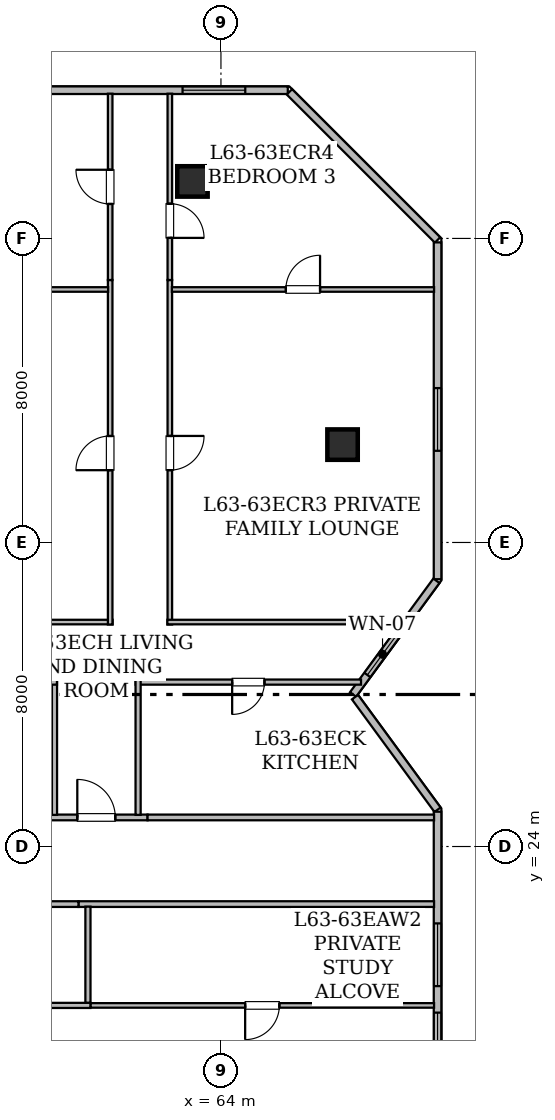
"""IFC4 building model, lengths in metres.
Left out: names, types, materials, properties, quantities, classifications, styles, units other than length and angle.
Written with IfcOpenShell. Run it as: python <this file> out.ifc"""

import sys

from ifc_helpers import new_model, si_unit, direction, frame, frame_2d, origin, origin_2d, place, context, subcontext, project, spatial, rectangle, hollow_rectangle, extrude, element, fill, save


model = new_model("IFC4")
c1 = context("Model", 3, precision=1e-05, world=origin(), true_north=direction((0.0, 1.0)))
c2 = subcontext(c1, "Body", "Model", "MODEL_VIEW")
j1 = project(units=[si_unit("LENGTHUNIT", "METRE"), si_unit("PLANEANGLEUNIT", "RADIAN")], contexts=[c1])
p1 = place(None, origin())
s1 = spatial("IfcSite", under=j1, at=p1, CompositionType="ELEMENT")
p2 = place(p1, origin())
s2 = spatial("IfcBuilding", under=s1, at=p2, CompositionType="ELEMENT")
p3 = place(p2, frame((0.0, 0.0, 246.4)))
s3 = spatial("IfcBuildingStorey", under=s2, at=p3, CompositionType="ELEMENT", Elevation=246.4)
for number, where, z_axis, x_axis in (
    (1, (63.25, 41.5, 0.0), (0.0, 0.0, 1.0), (1.0, 0.0, 0.0)),
    (2, (67.2, 21.425, 0.0), (0.0, 0.0, 1.0), (1.0, 0.0, 0.0)),
    (3, (67.2, 34.575, 0.0), (0.0, 0.0, 1.0), (1.0, 0.0, 0.0)),
):
    element("IfcColumn", number, at=place(p3, frame(where, z_axis=z_axis, x_axis=x_axis)), inside=s3, PredefinedType="COLUMN", context=c2, shape_type="SweptSolid", body=[
        extrude(hollow_rectangle(XDim=0.8, YDim=0.8, WallThickness=0.04, at=origin_2d()), origin(), (0.0, 0.0, 1.0), 3.65),
    ])
p4 = place(p3, frame((24.302, 43.9, 0.0), z_axis=(0.0, 0.0, 1.0), x_axis=(1.0, 0.0, 0.0)))
e4 = element("IfcWall", 4, at=p4, inside=s3, PredefinedType="STANDARD", context=c2, shape_type="SweptSolid", body=[
    extrude(rectangle(XDim=41.457, YDim=0.2, at=frame_2d((20.729, 0.0))), origin(), (0.0, 0.0, 1.0), 3.43),
])
p5 = place(p4, frame((4.673, 0.0, 0.85)))
e5 = element("IfcOpeningElement", 5, at=p5, cuts=e4, PredefinedType="OPENING", context=c2, shape_type="SweptSolid", body=[
    extrude(rectangle(XDim=1.65, YDim=1.55, at=frame_2d((0.825, 0.775))), frame((0.0, 0.11, 0.0), z_axis=(0.0, -1.0, 0.0), x_axis=(1.0, 0.0, 0.0)), (0.0, 0.0, 1.0), 0.22),
])
p6 = place(p4, frame((12.063, 0.0, 0.85)))
e6 = element("IfcOpeningElement", 6, at=p6, cuts=e4, PredefinedType="OPENING", context=c2, shape_type="SweptSolid", body=[
    extrude(rectangle(XDim=1.65, YDim=1.55, at=frame_2d((0.825, 0.775))), frame((0.0, 0.11, 0.0), z_axis=(0.0, -1.0, 0.0), x_axis=(1.0, 0.0, 0.0)), (0.0, 0.0, 1.0), 0.22),
])
p7 = place(p4, frame((14.905, 0.0, 0.85)))
e7 = element("IfcOpeningElement", 7, at=p7, cuts=e4, PredefinedType="OPENING", context=c2, shape_type="SweptSolid", body=[
    extrude(rectangle(XDim=1.65, YDim=1.55, at=frame_2d((0.825, 0.775))), frame((0.0, 0.11, 0.0), z_axis=(0.0, -1.0, 0.0), x_axis=(1.0, 0.0, 0.0)), (0.0, 0.0, 1.0), 0.22),
])
p8 = place(p4, frame((17.825, 0.0, 0.85)))
e8 = element("IfcOpeningElement", 8, at=p8, cuts=e4, PredefinedType="OPENING", context=c2, shape_type="SweptSolid", body=[
    extrude(rectangle(XDim=1.65, YDim=1.55, at=frame_2d((0.825, 0.775))), frame((0.0, 0.11, 0.0), z_axis=(0.0, -1.0, 0.0), x_axis=(1.0, 0.0, 0.0)), (0.0, 0.0, 1.0), 0.22),
])
p9 = place(p4, frame((20.176, 0.0, 0.8)))
e9 = element("IfcOpeningElement", 9, at=p9, cuts=e4, PredefinedType="OPENING", context=c2, shape_type="SweptSolid", body=[
    extrude(rectangle(XDim=1.2, YDim=1.5, at=frame_2d((0.6, 0.75))), frame((0.0, 0.11, 0.0), z_axis=(0.0, -1.0, 0.0), x_axis=(1.0, 0.0, 0.0)), (0.0, 0.0, 1.0), 0.22),
])
p10 = place(p4, frame((22.605, 0.0, 0.85)))
e10 = element("IfcOpeningElement", 10, at=p10, cuts=e4, PredefinedType="OPENING", context=c2, shape_type="SweptSolid", body=[
    extrude(rectangle(XDim=1.65, YDim=1.55, at=frame_2d((0.825, 0.775))), frame((0.0, 0.11, 0.0), z_axis=(0.0, -1.0, 0.0), x_axis=(1.0, 0.0, 0.0)), (0.0, 0.0, 1.0), 0.22),
])
p11 = place(p4, frame((26.664, 0.0, 0.85)))
e11 = element("IfcOpeningElement", 11, at=p11, cuts=e4, PredefinedType="OPENING", context=c2, shape_type="SweptSolid", body=[
    extrude(rectangle(XDim=1.65, YDim=1.55, at=frame_2d((0.825, 0.775))), frame((0.0, 0.11, 0.0), z_axis=(0.0, -1.0, 0.0), x_axis=(1.0, 0.0, 0.0)), (0.0, 0.0, 1.0), 0.22),
])
p12 = place(p4, frame((32.408, 0.0, 0.85)))
e12 = element("IfcOpeningElement", 12, at=p12, cuts=e4, PredefinedType="OPENING", context=c2, shape_type="SweptSolid", body=[
    extrude(rectangle(XDim=1.65, YDim=1.55, at=frame_2d((0.825, 0.775))), frame((0.0, 0.11, 0.0), z_axis=(0.0, -1.0, 0.0), x_axis=(1.0, 0.0, 0.0)), (0.0, 0.0, 1.0), 0.22),
])
p13 = place(p4, frame((38.688, 0.0, 0.85)))
e13 = element("IfcOpeningElement", 13, at=p13, cuts=e4, PredefinedType="OPENING", context=c2, shape_type="SweptSolid", body=[
    extrude(rectangle(XDim=1.65, YDim=1.55, at=frame_2d((0.825, 0.775))), frame((0.0, 0.11, 0.0), z_axis=(0.0, -1.0, 0.0), x_axis=(1.0, 0.0, 0.0)), (0.0, 0.0, 1.0), 0.22),
])
p14 = place(p3, frame((65.802, 43.857, 0.0), z_axis=(0.0, 0.0, 1.0), x_axis=(0.707106781187, -0.707106781187, 0.0)))
e14 = element("IfcWall", 14, at=p14, inside=s3, PredefinedType="STANDARD", context=c2, shape_type="SweptSolid", body=[
    extrude(rectangle(XDim=5.512, YDim=0.2, at=frame_2d((2.756, 0.0))), origin(), (0.0, 0.0, 1.0), 3.43),
])
p15 = place(p3, frame((69.7, 39.896, 0.0), z_axis=(0.0, 0.0, 1.0), x_axis=(0.0, -1.0, 0.0)))
e15 = element("IfcWall", 15, at=p15, inside=s3, PredefinedType="STANDARD", context=c2, shape_type="SweptSolid", body=[
    extrude(rectangle(XDim=8.863, YDim=0.2, at=frame_2d((4.432, 0.0))), origin(), (0.0, 0.0, 1.0), 3.43),
])
p16 = place(p15, frame((3.834, 0.0, 0.85)))
e16 = element("IfcOpeningElement", 16, at=p16, cuts=e15, PredefinedType="OPENING", context=c2, shape_type="SweptSolid", body=[
    extrude(rectangle(XDim=1.65, YDim=1.55, at=frame_2d((0.825, 0.775))), frame((0.0, 0.11, 0.0), z_axis=(0.0, -1.0, 0.0), x_axis=(1.0, 0.0, 0.0)), (0.0, 0.0, 1.0), 0.22),
])
p17 = place(p3, frame((69.67, 30.992, 0.0), z_axis=(0.0, 0.0, 1.0), x_axis=(-0.591320870733, -0.806436375566, 0.0)))
e17 = element("IfcWall", 17, at=p17, inside=s3, PredefinedType="STANDARD", context=c2, shape_type="SweptSolid", body=[
    extrude(rectangle(XDim=3.71, YDim=0.2, at=frame_2d((1.855, 0.0))), origin(), (0.0, 0.0, 1.0), 3.43),
])
p18 = place(p17, frame((1.723, 0.0, 0.85)))
e18 = element("IfcOpeningElement", 18, at=p18, cuts=e17, PredefinedType="OPENING", context=c2, shape_type="SweptSolid", body=[
    extrude(rectangle(XDim=1.35, YDim=1.5, at=frame_2d((0.675, 0.75))), frame((0.0, 0.11, 0.0), z_axis=(0.0, -1.0, 0.0), x_axis=(1.0, 0.0, 0.0)), (0.0, 0.0, 1.0), 0.22),
])
p19 = place(p3, frame((67.527, 27.931, 0.0), z_axis=(0.0, 0.0, 1.0), x_axis=(0.591248456881, -0.80648946815, 0.0)))
e19 = element("IfcWall", 19, at=p19, inside=s3, PredefinedType="STANDARD", context=c2, shape_type="SweptSolid", body=[
    extrude(rectangle(XDim=3.675, YDim=0.2, at=frame_2d((1.837, 0.0))), origin(), (0.0, 0.0, 1.0), 3.43),
])
p20 = place(p3, frame((69.7, 24.916, 0.0), z_axis=(0.0, 0.0, 1.0), x_axis=(0.0, -1.0, 0.0)))
e20 = element("IfcWall", 20, at=p20, inside=s3, PredefinedType="STANDARD", context=c2, shape_type="SweptSolid", body=[
    extrude(rectangle(XDim=8.875, YDim=0.2, at=frame_2d((4.438, 0.0))), origin(), (0.0, 0.0, 1.0), 3.43),
])
p21 = place(p20, frame((2.939, 0.0, 0.85)))
e21 = element("IfcOpeningElement", 21, at=p21, cuts=e20, PredefinedType="OPENING", context=c2, shape_type="SweptSolid", body=[
    extrude(rectangle(XDim=1.65, YDim=1.55, at=frame_2d((0.825, 0.775))), frame((0.0, 0.11, 0.0), z_axis=(0.0, -1.0, 0.0), x_axis=(1.0, 0.0, 0.0)), (0.0, 0.0, 1.0), 0.22),
])
p22 = place(p20, frame((5.287, 0.0, 0.8)))
e22 = element("IfcOpeningElement", 22, at=p22, cuts=e20, PredefinedType="OPENING", context=c2, shape_type="SweptSolid", body=[
    extrude(rectangle(XDim=1.2, YDim=1.5, at=frame_2d((0.6, 0.75))), frame((0.0, 0.11, 0.0), z_axis=(0.0, -1.0, 0.0), x_axis=(1.0, 0.0, 0.0)), (0.0, 0.0, 1.0), 0.22),
])
p23 = place(p3, frame((69.608, 22.485, 0.0), z_axis=(0.0, 0.0, 1.0), x_axis=(-1.0, 0.0, 0.0)))
e23 = element("IfcWall", 23, at=p23, inside=s3, PredefinedType="STANDARD", context=c2, shape_type="SweptSolid", body=[
    extrude(rectangle(XDim=9.357, YDim=0.15, at=frame_2d((4.678, 0.0))), origin(), (0.0, 0.0, 1.0), 2.887),
])
p24 = place(p3, frame((60.251, 22.485, 0.0), z_axis=(0.0, 0.0, 1.0), x_axis=(-1.0, 0.0, 0.0)))
e24 = element("IfcWall", 24, at=p24, inside=s3, PredefinedType="STANDARD", context=c2, shape_type="SweptSolid", body=[
    extrude(rectangle(XDim=4.367, YDim=0.15, at=frame_2d((2.184, 0.0))), origin(), (0.0, 0.0, 1.0), 3.43),
])
p25 = place(p3, frame((59.371, 24.765, 0.0), z_axis=(0.0, 0.0, 1.0), x_axis=(1.0, 0.0, 0.0)))
e25 = element("IfcWall", 25, at=p25, inside=s3, PredefinedType="STANDARD", context=c2, shape_type="SweptSolid", body=[
    extrude(rectangle(XDim=2.698, YDim=0.15, at=frame_2d((1.349, 0.0))), origin(), (0.0, 0.0, 1.0), 3.43),
])
p26 = place(p25, frame((0.849, 0.0, 0.0)))
e26 = element("IfcOpeningElement", 26, at=p26, cuts=e25, PredefinedType="OPENING", context=c2, shape_type="SweptSolid", body=[
    extrude(rectangle(XDim=1.0, YDim=2.15, at=frame_2d((0.5, 1.075))), frame((0.0, 0.085, 0.0), z_axis=(0.0, -1.0, 0.0), x_axis=(1.0, 0.0, 0.0)), (0.0, 0.0, 1.0), 0.17),
])
p27 = place(p3, frame((62.069, 24.765, 0.0), z_axis=(0.0, 0.0, 1.0), x_axis=(1.0, 0.0, 0.0)))
e27 = element("IfcWall", 27, at=p27, inside=s3, PredefinedType="STANDARD", context=c2, shape_type="SweptSolid", body=[
    extrude(rectangle(XDim=7.539, YDim=0.15, at=frame_2d((3.77, 0.0))), origin(), (0.0, 0.0, 1.0), 2.887),
])
p28 = place(p3, frame((69.608, 19.819, 0.0), z_axis=(0.0, 0.0, 1.0), x_axis=(-1.0, 0.0, 0.0)))
e28 = element("IfcWall", 28, at=p28, inside=s3, PredefinedType="PARTITIONING", context=c2, shape_type="SweptSolid", body=[
    extrude(rectangle(XDim=9.043, YDim=0.12, at=frame_2d((4.521, 0.0))), origin(), (0.0, 0.0, 1.0), 2.725),
])
p29 = place(p28, frame((4.071, 0.0, 0.0)))
e29 = element("IfcOpeningElement", 29, at=p29, cuts=e28, PredefinedType="OPENING", context=c2, shape_type="SweptSolid", body=[
    extrude(rectangle(XDim=0.9, YDim=2.1, at=frame_2d((0.45, 1.05))), frame((0.0, 0.07, 0.0), z_axis=(0.0, -1.0, 0.0), x_axis=(1.0, 0.0, 0.0)), (0.0, 0.0, 1.0), 0.14),
])
p30 = place(p3, frame((60.5, 19.884, 0.0), z_axis=(0.0, 0.0, 1.0), x_axis=(0.0, 1.0, 0.0)))
e30 = element("IfcWall", 30, at=p30, inside=s3, PredefinedType="PARTITIONING", context=c2, shape_type="SweptSolid", body=[
    extrude(rectangle(XDim=2.534, YDim=0.135, at=frame_2d((1.267, 0.0))), origin(), (0.0, 0.0, 1.0), 3.43),
])
p31 = place(p3, frame((55.57, 19.819, 0.0), z_axis=(0.0, 0.0, 1.0), x_axis=(1.0, 0.0, 0.0)))
e31 = element("IfcWall", 31, at=p31, inside=s3, PredefinedType="PARTITIONING", context=c2, shape_type="SweptSolid", body=[
    extrude(rectangle(XDim=4.995, YDim=0.135, at=frame_2d((2.498, 0.0))), origin(), (0.0, 0.0, 1.0), 2.725),
])
p32 = place(p31, frame((2.073, 0.0, 0.0)))
e32 = element("IfcOpeningElement", 32, at=p32, cuts=e31, PredefinedType="OPENING", context=c2, shape_type="SweptSolid", body=[
    extrude(rectangle(XDim=0.85, YDim=2.1, at=frame_2d((0.425, 1.05))), frame((0.0, 0.077, 0.0), z_axis=(0.0, -1.0, 0.0), x_axis=(1.0, 0.0, 0.0)), (0.0, 0.0, 1.0), 0.155),
])
p33 = place(p3, frame((59.62, 24.832, 0.0), z_axis=(0.0, 0.0, 1.0), x_axis=(0.0, 1.0, 0.0)))
e33 = element("IfcWall", 33, at=p33, inside=s3, PredefinedType="PARTITIONING", context=c2, shape_type="SweptSolid", body=[
    extrude(rectangle(XDim=3.559, YDim=0.135, at=frame_2d((1.78, 0.0))), origin(), (0.0, 0.0, 1.0), 3.43),
])
p34 = place(p3, frame((59.685, 28.326, 0.0), z_axis=(0.0, 0.0, 1.0), x_axis=(-1.0, 0.0, 0.0)))
e34 = element("IfcWall", 34, at=p34, inside=s3, PredefinedType="PARTITIONING", context=c2, shape_type="SweptSolid", body=[
    extrude(rectangle(XDim=5.618, YDim=0.135, at=frame_2d((2.809, 0.0))), origin(), (0.0, 0.0, 1.0), 3.43),
])
p35 = place(p34, frame((2.384, 0.0, 0.0)))
e35 = element("IfcOpeningElement", 35, at=p35, cuts=e34, PredefinedType="OPENING", context=c2, shape_type="SweptSolid", body=[
    extrude(rectangle(XDim=0.85, YDim=2.1, at=frame_2d((0.425, 1.05))), frame((0.0, 0.077, 0.0), z_axis=(0.0, -1.0, 0.0), x_axis=(1.0, 0.0, 0.0)), (0.0, 0.0, 1.0), 0.155),
])
p36 = place(p3, frame((67.686, 28.326, 0.0), z_axis=(0.0, 0.0, 1.0), x_axis=(-1.0, 0.0, 0.0)))
e36 = element("IfcWall", 36, at=p36, inside=s3, PredefinedType="PARTITIONING", context=c2, shape_type="SweptSolid", body=[
    extrude(rectangle(XDim=5.931, YDim=0.135, at=frame_2d((2.966, 0.0))), origin(), (0.0, 0.0, 1.0), 2.887),
])
p37 = place(p36, frame((2.541, 0.0, 0.0)))
e37 = element("IfcOpeningElement", 37, at=p37, cuts=e36, PredefinedType="OPENING", context=c2, shape_type="SweptSolid", body=[
    extrude(rectangle(XDim=0.85, YDim=2.1, at=frame_2d((0.425, 1.05))), frame((0.0, 0.077, 0.0), z_axis=(0.0, -1.0, 0.0), x_axis=(1.0, 0.0, 0.0)), (0.0, 0.0, 1.0), 0.155),
])
p38 = place(p3, frame((61.82, 28.391, 0.0), z_axis=(0.0, 0.0, 1.0), x_axis=(0.0, -1.0, 0.0)))
e38 = element("IfcWall", 38, at=p38, inside=s3, PredefinedType="PARTITIONING", context=c2, shape_type="SweptSolid", body=[
    extrude(rectangle(XDim=3.559, YDim=0.135, at=frame_2d((1.78, 0.0))), origin(), (0.0, 0.0, 1.0), 3.43),
])
p39 = place(p3, frame((54.067, 29.906, 0.0), z_axis=(0.0, 0.0, 1.0), x_axis=(1.0, 0.0, 0.0)))
e39 = element("IfcWall", 39, at=p39, inside=s3, PredefinedType="PARTITIONING", context=c2, shape_type="SweptSolid", body=[
    extrude(rectangle(XDim=7.083, YDim=0.12, at=frame_2d((3.542, 0.0))), origin(), (0.0, 0.0, 1.0), 3.43),
])
p40 = place(p3, frame((61.085, 29.841, 0.0), z_axis=(0.0, 0.0, 1.0), x_axis=(0.0, 1.0, 0.0)))
e40 = element("IfcWall", 40, at=p40, inside=s3, PredefinedType="PARTITIONING", context=c2, shape_type="SweptSolid", body=[
    extrude(rectangle(XDim=9.065, YDim=0.12, at=frame_2d((4.532, 0.0))), origin(), (0.0, 0.0, 1.0), 2.687),
])
p41 = place(p40, frame((4.061, 0.0, 0.0)))
e41 = element("IfcOpeningElement", 41, at=p41, cuts=e40, PredefinedType="OPENING", context=c2, shape_type="SweptSolid", body=[
    extrude(rectangle(XDim=0.9, YDim=2.1, at=frame_2d((0.45, 1.05))), frame((0.0, 0.07, 0.0), z_axis=(0.0, -1.0, 0.0), x_axis=(1.0, 0.0, 0.0)), (0.0, 0.0, 1.0), 0.14),
])
p42 = place(p3, frame((61.085, 38.906, 0.0), z_axis=(0.0, 0.0, 1.0), x_axis=(0.0, 1.0, 0.0)))
e42 = element("IfcWall", 42, at=p42, inside=s3, PredefinedType="PARTITIONING", context=c2, shape_type="SweptSolid", body=[
    extrude(rectangle(XDim=4.902, YDim=0.12, at=frame_2d((2.451, 0.0))), origin(), (0.0, 0.0, 1.0), 2.725),
])
p43 = place(p42, frame((2.001, 0.0, 0.0)))
e43 = element("IfcOpeningElement", 43, at=p43, cuts=e42, PredefinedType="OPENING", context=c2, shape_type="SweptSolid", body=[
    extrude(rectangle(XDim=0.9, YDim=2.1, at=frame_2d((0.45, 1.05))), frame((0.0, 0.07, 0.0), z_axis=(0.0, -1.0, 0.0), x_axis=(1.0, 0.0, 0.0)), (0.0, 0.0, 1.0), 0.14),
])
p44 = place(p3, frame((62.655, 38.906, 0.0), z_axis=(0.0, 0.0, 1.0), x_axis=(0.0, -1.0, 0.0)))
e44 = element("IfcWall", 44, at=p44, inside=s3, PredefinedType="PARTITIONING", context=c2, shape_type="SweptSolid", body=[
    extrude(rectangle(XDim=9.065, YDim=0.12, at=frame_2d((4.532, 0.0))), origin(), (0.0, 0.0, 1.0), 2.687),
])
p45 = place(p44, frame((4.103, 0.0, 0.0)))
e45 = element("IfcOpeningElement", 45, at=p45, cuts=e44, PredefinedType="OPENING", context=c2, shape_type="SweptSolid", body=[
    extrude(rectangle(XDim=0.9, YDim=2.1, at=frame_2d((0.45, 1.05))), frame((0.0, 0.07, 0.0), z_axis=(0.0, -1.0, 0.0), x_axis=(1.0, 0.0, 0.0)), (0.0, 0.0, 1.0), 0.14),
])
p46 = place(p3, frame((62.59, 29.906, 0.0), z_axis=(0.0, 0.0, 1.0), x_axis=(1.0, 0.0, 0.0)))
e46 = element("IfcWall", 46, at=p46, inside=s3, PredefinedType="PARTITIONING", context=c2, shape_type="SweptSolid", body=[
    extrude(rectangle(XDim=6.18, YDim=0.12, at=frame_2d((3.09, 0.0))), origin(), (0.0, 0.0, 1.0), 2.887),
])
p47 = place(p3, frame((62.655, 43.808, 0.0), z_axis=(0.0, 0.0, 1.0), x_axis=(0.0, -1.0, 0.0)))
e47 = element("IfcWall", 47, at=p47, inside=s3, PredefinedType="PARTITIONING", context=c2, shape_type="SweptSolid", body=[
    extrude(rectangle(XDim=4.902, YDim=0.12, at=frame_2d((2.451, 0.0))), origin(), (0.0, 0.0, 1.0), 2.725),
])
p48 = place(p47, frame((2.894, 0.0, 0.0)))
e48 = element("IfcOpeningElement", 48, at=p48, cuts=e47, PredefinedType="OPENING", context=c2, shape_type="SweptSolid", body=[
    extrude(rectangle(XDim=0.9, YDim=2.1, at=frame_2d((0.45, 1.05))), frame((0.0, 0.07, 0.0), z_axis=(0.0, -1.0, 0.0), x_axis=(1.0, 0.0, 0.0)), (0.0, 0.0, 1.0), 0.14),
])
p49 = place(p3, frame((54.067, 38.657, 0.0), z_axis=(0.0, 0.0, 1.0), x_axis=(1.0, 0.0, 0.0)))
e49 = element("IfcWall", 49, at=p49, inside=s3, PredefinedType="PARTITIONING", context=c2, shape_type="SweptSolid", body=[
    extrude(rectangle(XDim=6.964, YDim=0.12, at=frame_2d((3.482, 0.0))), origin(), (0.0, 0.0, 1.0), 2.725),
])
p50 = place(p49, frame((3.032, 0.0, 0.0)))
e50 = element("IfcOpeningElement", 50, at=p50, cuts=e49, PredefinedType="OPENING", context=c2, shape_type="SweptSolid", body=[
    extrude(rectangle(XDim=0.9, YDim=2.1, at=frame_2d((0.45, 1.05))), frame((0.0, 0.07, 0.0), z_axis=(0.0, -1.0, 0.0), x_axis=(1.0, 0.0, 0.0)), (0.0, 0.0, 1.0), 0.14),
])
p51 = place(p3, frame((62.709, 38.657, 0.0), z_axis=(0.0, 0.0, 1.0), x_axis=(1.0, 0.0, 0.0)))
e51 = element("IfcWall", 51, at=p51, inside=s3, PredefinedType="PARTITIONING", context=c2, shape_type="SweptSolid", body=[
    extrude(rectangle(XDim=6.899, YDim=0.12, at=frame_2d((3.449, 0.0))), origin(), (0.0, 0.0, 1.0), 2.887),
])
p52 = place(p51, frame((2.999, 0.0, 0.0)))
e52 = element("IfcOpeningElement", 52, at=p52, cuts=e51, PredefinedType="OPENING", context=c2, shape_type="SweptSolid", body=[
    extrude(rectangle(XDim=0.9, YDim=2.1, at=frame_2d((0.45, 1.05))), frame((0.0, 0.07, 0.0), z_axis=(0.0, -1.0, 0.0), x_axis=(1.0, 0.0, 0.0)), (0.0, 0.0, 1.0), 0.14),
])
p53 = place(p21, origin())
e53 = element("IfcWindow", 53, at=p53, inside=s3, PartitioningType="SINGLE_PANEL", PredefinedType="WINDOW", context=c2, shape_type="SweptSolid", body=[
    extrude(rectangle(XDim=1.65, YDim=1.55, at=frame_2d((0.825, 0.775))), frame((0.0, 0.03, 0.0), z_axis=(0.0, -1.0, 0.0), x_axis=(1.0, 0.0, 0.0)), (0.0, 0.0, 1.0), 0.06),
])
fill(e21, e53)
p54 = place(p22, origin())
e54 = element("IfcWindow", 54, at=p54, inside=s3, PartitioningType="SINGLE_PANEL", PredefinedType="WINDOW", context=c2, shape_type="SweptSolid", body=[
    extrude(rectangle(XDim=1.2, YDim=1.5, at=frame_2d((0.6, 0.75))), frame((0.0, 0.03, 0.0), z_axis=(0.0, -1.0, 0.0), x_axis=(1.0, 0.0, 0.0)), (0.0, 0.0, 1.0), 0.06),
])
fill(e22, e54)
p55 = place(p18, origin())
e55 = element("IfcWindow", 55, at=p55, inside=s3, PartitioningType="SINGLE_PANEL", PredefinedType="WINDOW", context=c2, shape_type="SweptSolid", body=[
    extrude(rectangle(XDim=1.35, YDim=1.5, at=frame_2d((0.675, 0.75))), frame((0.0, 0.03, 0.0), z_axis=(0.0, -1.0, 0.0), x_axis=(1.0, 0.0, 0.0)), (0.0, 0.0, 1.0), 0.06),
])
fill(e18, e55)
p56 = place(p16, origin())
e56 = element("IfcWindow", 56, at=p56, inside=s3, PartitioningType="SINGLE_PANEL", PredefinedType="WINDOW", context=c2, shape_type="SweptSolid", body=[
    extrude(rectangle(XDim=1.65, YDim=1.55, at=frame_2d((0.825, 0.775))), frame((0.0, 0.03, 0.0), z_axis=(0.0, -1.0, 0.0), x_axis=(1.0, 0.0, 0.0)), (0.0, 0.0, 1.0), 0.06),
])
fill(e16, e56)
p57 = place(p13, origin())
e57 = element("IfcWindow", 57, at=p57, inside=s3, PartitioningType="SINGLE_PANEL", PredefinedType="WINDOW", context=c2, shape_type="SweptSolid", body=[
    extrude(rectangle(XDim=1.65, YDim=1.55, at=frame_2d((0.825, 0.775))), frame((0.0, 0.03, 0.0), z_axis=(0.0, -1.0, 0.0), x_axis=(1.0, 0.0, 0.0)), (0.0, 0.0, 1.0), 0.06),
])
fill(e13, e57)
p58 = place(p26, origin())
e58 = element("IfcDoor", 58, at=p58, inside=s3, OperationType="SINGLE_SWING_LEFT", PredefinedType="DOOR", context=c2, shape_type="SweptSolid", body=[
    extrude(rectangle(XDim=1.0, YDim=2.15, at=frame_2d((0.5, 1.075))), frame((0.0, 0.025, 0.0), z_axis=(0.0, -1.0, 0.0), x_axis=(1.0, 0.0, 0.0)), (0.0, 0.0, 1.0), 0.05),
])
fill(e26, e58)
p59 = place(p29, origin())
e59 = element("IfcDoor", 59, at=p59, inside=s3, OperationType="SINGLE_SWING_RIGHT", PredefinedType="DOOR", context=c2, shape_type="SweptSolid", body=[
    extrude(rectangle(XDim=0.9, YDim=2.1, at=frame_2d((0.45, 1.05))), frame((0.0, 0.025, 0.0), z_axis=(0.0, -1.0, 0.0), x_axis=(1.0, 0.0, 0.0)), (0.0, 0.0, 1.0), 0.05),
])
fill(e29, e59)
p60 = place(p37, origin())
e60 = element("IfcDoor", 60, at=p60, inside=s3, OperationType="SINGLE_SWING_RIGHT", PredefinedType="DOOR", context=c2, shape_type="SweptSolid", body=[
    extrude(rectangle(XDim=0.85, YDim=2.1, at=frame_2d((0.425, 1.05))), frame((0.0, 0.025, 0.0), z_axis=(0.0, -1.0, 0.0), x_axis=(1.0, 0.0, 0.0)), (0.0, 0.0, 1.0), 0.05),
])
fill(e37, e60)
p61 = place(p41, origin())
e61 = element("IfcDoor", 61, at=p61, inside=s3, OperationType="SINGLE_SWING_LEFT", PredefinedType="DOOR", context=c2, shape_type="SweptSolid", body=[
    extrude(rectangle(XDim=0.9, YDim=2.1, at=frame_2d((0.45, 1.05))), frame((0.0, 0.025, 0.0), z_axis=(0.0, -1.0, 0.0), x_axis=(1.0, 0.0, 0.0)), (0.0, 0.0, 1.0), 0.05),
])
fill(e41, e61)
p62 = place(p43, origin())
e62 = element("IfcDoor", 62, at=p62, inside=s3, OperationType="SINGLE_SWING_RIGHT", PredefinedType="DOOR", context=c2, shape_type="SweptSolid", body=[
    extrude(rectangle(XDim=0.9, YDim=2.1, at=frame_2d((0.45, 1.05))), frame((0.0, 0.025, 0.0), z_axis=(0.0, -1.0, 0.0), x_axis=(1.0, 0.0, 0.0)), (0.0, 0.0, 1.0), 0.05),
])
fill(e43, e62)
p63 = place(p45, origin())
e63 = element("IfcDoor", 63, at=p63, inside=s3, OperationType="SINGLE_SWING_LEFT", PredefinedType="DOOR", context=c2, shape_type="SweptSolid", body=[
    extrude(rectangle(XDim=0.9, YDim=2.1, at=frame_2d((0.45, 1.05))), frame((0.0, 0.025, 0.0), z_axis=(0.0, -1.0, 0.0), x_axis=(1.0, 0.0, 0.0)), (0.0, 0.0, 1.0), 0.05),
])
fill(e45, e63)
p64 = place(p48, origin())
e64 = element("IfcDoor", 64, at=p64, inside=s3, OperationType="SINGLE_SWING_RIGHT", PredefinedType="DOOR", context=c2, shape_type="SweptSolid", body=[
    extrude(rectangle(XDim=0.9, YDim=2.1, at=frame_2d((0.45, 1.05))), frame((0.0, 0.025, 0.0), z_axis=(0.0, -1.0, 0.0), x_axis=(1.0, 0.0, 0.0)), (0.0, 0.0, 1.0), 0.05),
])
fill(e48, e64)
p65 = place(p52, origin())
e65 = element("IfcDoor", 65, at=p65, inside=s3, OperationType="SINGLE_SWING_RIGHT", PredefinedType="DOOR", context=c2, shape_type="SweptSolid", body=[
    extrude(rectangle(XDim=0.9, YDim=2.1, at=frame_2d((0.45, 1.05))), frame((0.0, 0.025, 0.0), z_axis=(0.0, -1.0, 0.0), x_axis=(1.0, 0.0, 0.0)), (0.0, 0.0, 1.0), 0.05),
])
fill(e52, e65)
save(model, sys.argv[1])
